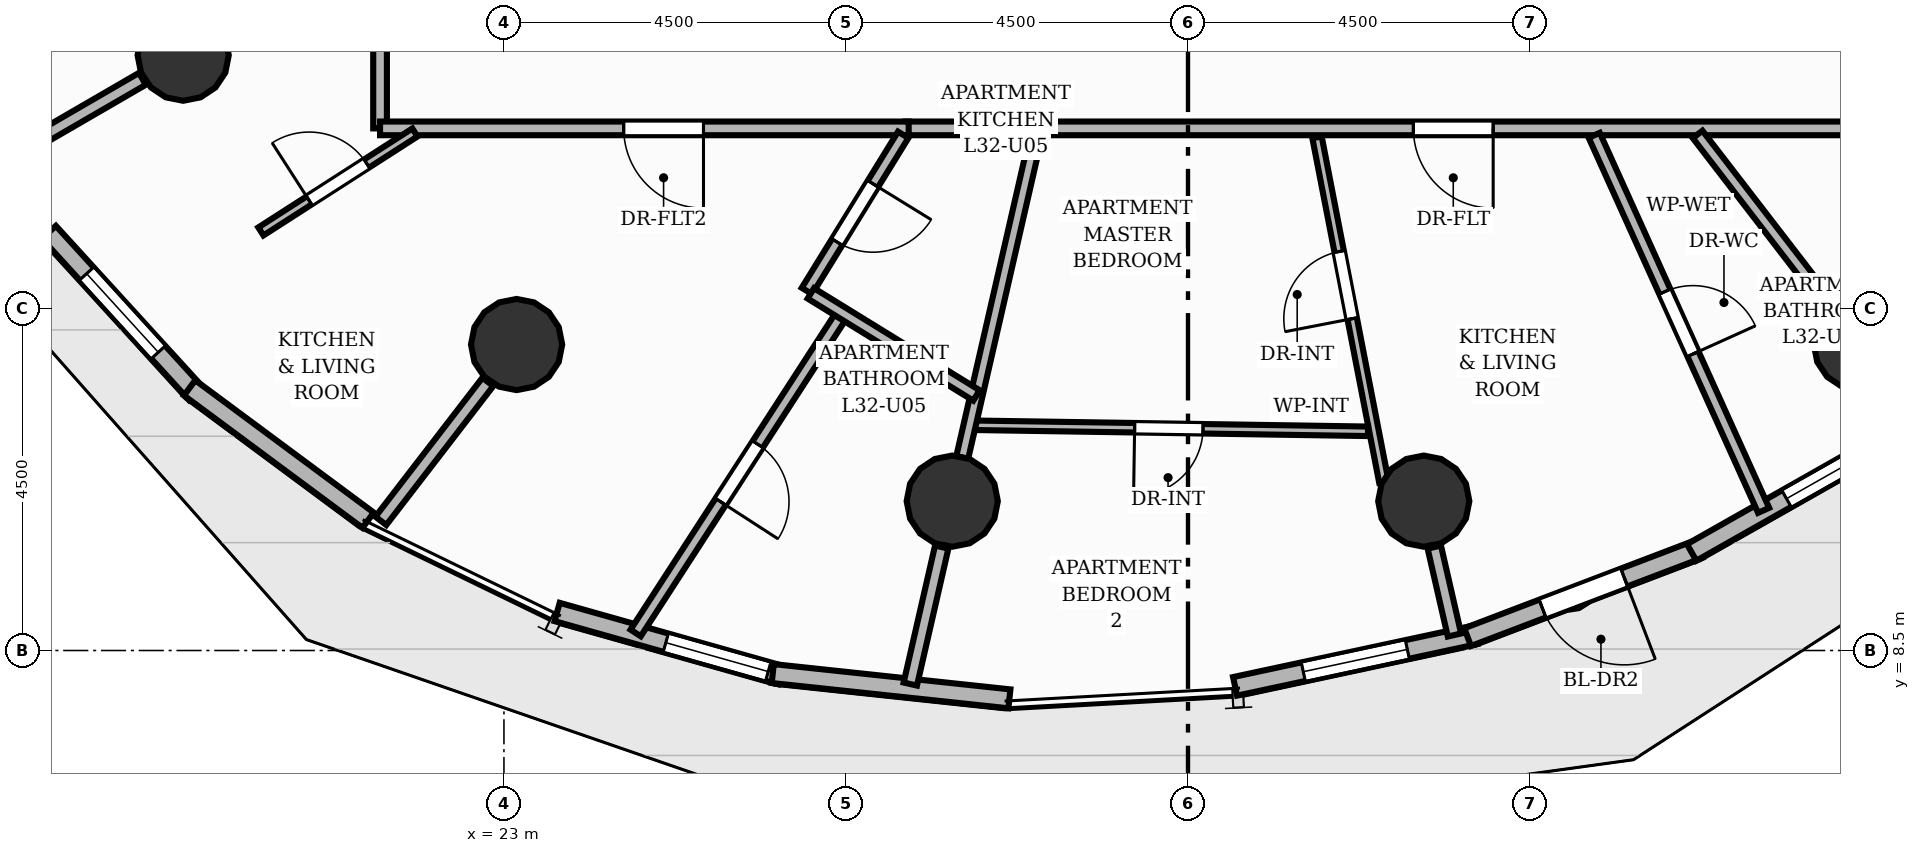
"""IFC4 building model, lengths in metres.
Left out: names, types, materials, properties, quantities, classifications, styles, units other than length and angle.
Written with IfcOpenShell. Run it as: python <this file> out.ifc"""

import sys

from ifc_helpers import new_model, si_unit, direction, frame, frame_2d, origin, origin_2d, place, context, subcontext, project, spatial, rectangle, circle, extrude, element, fill, save


model = new_model("IFC4")
c1 = context("Model", 3, precision=1e-05, world=origin(), true_north=direction((0.0, 1.0)))
c2 = subcontext(c1, "Body", "Model", "MODEL_VIEW")
j1 = project(units=[si_unit("LENGTHUNIT", "METRE"), si_unit("PLANEANGLEUNIT", "RADIAN")], contexts=[c1])
p1 = place(None, origin())
s1 = spatial("IfcSite", under=j1, at=p1, CompositionType="ELEMENT")
p2 = place(p1, origin())
s2 = spatial("IfcBuilding", under=s1, at=p2, CompositionType="ELEMENT")
p3 = place(p2, frame((0.0, 0.0, 109.28)))
s3 = spatial("IfcBuildingStorey", under=s2, at=p3, CompositionType="ELEMENT", Elevation=109.28)
for number, where, z_axis, x_axis in (
    (1, (18.78, 16.333, 0.0), (0.0, 0.0, 1.0), (1.0, 0.0, 0.0)),
    (2, (23.167, 12.526, 0.0), (0.0, 0.0, 1.0), (1.0, 0.0, 0.0)),
    (3, (28.898, 10.465, 0.0), (0.0, 0.0, 1.0), (1.0, 0.0, 0.0)),
    (4, (35.102, 10.465, 0.0), (0.0, 0.0, 1.0), (1.0, 0.0, 0.0)),
    (5, (40.833, 12.526, 0.0), (0.0, 0.0, 1.0), (1.0, 0.0, 0.0)),
):
    element("IfcColumn", number, at=place(p3, frame(where, z_axis=z_axis, x_axis=x_axis)), inside=s3, PredefinedType="COLUMN", context=c2, shape_type="SweptSolid", body=[
        extrude(circle(Radius=0.6, at=origin_2d()), origin(), (0.0, 0.0, 1.0), 3.2),
    ])
p4 = place(p3, frame((18.949, 11.879, 0.0), z_axis=(0.0, 0.0, 1.0), x_axis=(-0.673691100196, 0.739013059098, 0.0)))
e6 = element("IfcWall", 6, at=p4, inside=s3, PredefinedType="SOLIDWALL", context=c2, shape_type="SweptSolid", body=[
    extrude(rectangle(XDim=2.874, YDim=0.25, at=frame_2d((1.437, 0.0))), origin(), (0.0, 0.0, 1.0), 2.8),
])
p5 = place(p4, frame((0.737, 0.0, 0.85)))
e7 = element("IfcOpeningElement", 7, at=p5, cuts=e6, PredefinedType="OPENING", context=c2, shape_type="SweptSolid", body=[
    extrude(rectangle(XDim=1.4, YDim=1.55, at=frame_2d((0.7, 0.775))), frame((0.0, 0.135, 0.0), z_axis=(0.0, -1.0, 0.0), x_axis=(1.0, 0.0, 0.0)), (0.0, 0.0, 1.0), 0.27),
])
p6 = place(p3, frame((21.213, 10.215, 0.0), z_axis=(0.0, 0.0, 1.0), x_axis=(-0.803255279066, 0.595634918933, 0.0)))
e8 = element("IfcWall", 8, at=p6, inside=s3, PredefinedType="SOLIDWALL", context=c2, shape_type="SweptSolid", body=[
    extrude(rectangle(XDim=2.923, YDim=0.25, at=frame_2d((1.462, 0.0))), origin(), (0.0, 0.0, 1.0), 2.8),
])
p7 = place(p3, frame((26.646, 8.175, 0.0), z_axis=(0.0, 0.0, 1.0), x_axis=(-0.962391946781, 0.271664758059, 0.0)))
e9 = element("IfcWall", 9, at=p7, inside=s3, PredefinedType="SOLIDWALL", context=c2, shape_type="SweptSolid", body=[
    extrude(rectangle(XDim=3.061, YDim=0.25, at=frame_2d((1.531, 0.0))), origin(), (0.0, 0.0, 1.0), 2.8),
])
p8 = place(p7, frame((0.175, 0.0, 0.85)))
e10 = element("IfcOpeningElement", 10, at=p8, cuts=e9, PredefinedType="OPENING", context=c2, shape_type="SweptSolid", body=[
    extrude(rectangle(XDim=1.4, YDim=1.55, at=frame_2d((0.7, 0.775))), frame((0.0, 0.135, 0.0), z_axis=(0.0, -1.0, 0.0), x_axis=(1.0, 0.0, 0.0)), (0.0, 0.0, 1.0), 0.27),
])
p9 = place(p3, frame((29.65, 7.864, 0.0), z_axis=(0.0, 0.0, 1.0), x_axis=(-0.994353607356, 0.106117404502, 0.0)))
e11 = element("IfcWall", 11, at=p9, inside=s3, PredefinedType="SOLIDWALL", context=c2, shape_type="SweptSolid", body=[
    extrude(rectangle(XDim=3.131, YDim=0.25, at=frame_2d((1.565, 0.0))), origin(), (0.0, 0.0, 1.0), 2.8),
])
p10 = place(p3, frame((35.783, 8.707, 0.0), z_axis=(0.0, 0.0, 1.0), x_axis=(-0.977758229837, -0.209735175845, 0.0)))
e12 = element("IfcWall", 12, at=p10, inside=s3, PredefinedType="SOLIDWALL", context=c2, shape_type="SweptSolid", body=[
    extrude(rectangle(XDim=3.236, YDim=0.25, at=frame_2d((1.618, 0.0))), origin(), (0.0, 0.0, 1.0), 2.8),
])
p11 = place(p10, frame((0.918, 0.0, 0.85)))
e13 = element("IfcOpeningElement", 13, at=p11, cuts=e12, PredefinedType="OPENING", context=c2, shape_type="SweptSolid", body=[
    extrude(rectangle(XDim=1.4, YDim=1.55, at=frame_2d((0.7, 0.775))), frame((0.0, 0.135, 0.0), z_axis=(0.0, -1.0, 0.0), x_axis=(1.0, 0.0, 0.0)), (0.0, 0.0, 1.0), 0.27),
])
p12 = place(p3, frame((38.725, 9.836, 0.0), z_axis=(0.0, 0.0, 1.0), x_axis=(-0.934481801939, -0.3560109013, 0.0)))
e14 = element("IfcWall", 14, at=p12, inside=s3, PredefinedType="SOLIDWALL", context=c2, shape_type="SweptSolid", body=[
    extrude(rectangle(XDim=3.26, YDim=0.25, at=frame_2d((1.63, 0.0))), origin(), (0.0, 0.0, 1.0), 2.8),
])
p13 = place(p12, frame((1.055, 0.0, 0.0)))
e15 = element("IfcOpeningElement", 15, at=p13, cuts=e14, PredefinedType="OPENING", context=c2, shape_type="SweptSolid", body=[
    extrude(rectangle(XDim=1.15, YDim=2.01, at=frame_2d((0.575, 1.005))), frame((0.0, 0.135, 0.0), z_axis=(0.0, -1.0, 0.0), x_axis=(1.0, 0.0, 0.0)), (0.0, 0.0, 1.0), 0.27),
])
p14 = place(p3, frame((41.462, 11.397, 0.0), z_axis=(0.0, 0.0, 1.0), x_axis=(-0.869984700924, -0.493078715986, 0.0)))
e16 = element("IfcWall", 16, at=p14, inside=s3, PredefinedType="SOLIDWALL", context=c2, shape_type="SweptSolid", body=[
    extrude(rectangle(XDim=3.26, YDim=0.25, at=frame_2d((1.63, 0.0))), origin(), (0.0, 0.0, 1.0), 2.8),
])
p15 = place(p14, frame((0.175, 0.0, 0.85)))
e17 = element("IfcOpeningElement", 17, at=p15, cuts=e16, PredefinedType="OPENING", context=c2, shape_type="SweptSolid", body=[
    extrude(rectangle(XDim=1.65, YDim=1.55, at=frame_2d((0.825, 0.775))), frame((0.0, 0.135, 0.0), z_axis=(0.0, -1.0, 0.0), x_axis=(1.0, 0.0, 0.0)), (0.0, 0.0, 1.0), 0.27),
])
p16 = place(p3, frame((18.243, 16.022, 0.0), z_axis=(0.0, 0.0, 1.0), x_axis=(-0.865046864493, -0.501691062539, 0.0)))
e18 = element("IfcWall", 18, at=p16, inside=s3, PredefinedType="PARTITIONING", context=c2, shape_type="SweptSolid", body=[
    extrude(rectangle(XDim=2.028, YDim=0.18, at=frame_2d((1.014, 0.0))), origin(), (0.0, 0.0, 1.0), 2.1),
])
p17 = place(p3, frame((22.788, 12.034, 0.0), z_axis=(0.0, 0.0, 1.0), x_axis=(-0.610007255548, -0.792395827967, 0.0)))
e19 = element("IfcWall", 19, at=p17, inside=s3, PredefinedType="PARTITIONING", context=c2, shape_type="SweptSolid", body=[
    extrude(rectangle(XDim=2.308, YDim=0.18, at=frame_2d((1.154, 0.0))), origin(), (0.0, 0.0, 1.0), 2.1),
])
p18 = place(p3, frame((28.76, 9.861, 0.0), z_axis=(0.0, 0.0, 1.0), x_axis=(-0.2234127464, -0.974723932581, 0.0)))
e20 = element("IfcWall", 20, at=p18, inside=s3, PredefinedType="PARTITIONING", context=c2, shape_type="SweptSolid", body=[
    extrude(rectangle(XDim=1.849, YDim=0.18, at=frame_2d((0.924, 0.0))), origin(), (0.0, 0.0, 1.0), 2.1),
])
p19 = place(p3, frame((35.24, 9.861, 0.0), z_axis=(0.0, 0.0, 1.0), x_axis=(0.223327310752, -0.974743511018, 0.0)))
e21 = element("IfcWall", 21, at=p19, inside=s3, PredefinedType="PARTITIONING", context=c2, shape_type="SweptSolid", body=[
    extrude(rectangle(XDim=1.187, YDim=0.18, at=frame_2d((0.594, 0.0))), origin(), (0.0, 0.0, 1.0), 2.1),
])
p20 = place(p3, frame((42.63, 15.37, 0.0), z_axis=(0.0, 0.0, 1.0), x_axis=(-1.0, 0.0, 0.0)))
e22 = element("IfcWall", 22, at=p20, inside=s3, PredefinedType="PARTITIONING", context=c2, shape_type="SweptSolid", body=[
    extrude(rectangle(XDim=14.346, YDim=0.18, at=frame_2d((7.173, 0.0))), origin(), (0.0, 0.0, 1.0), 2.795),
])
p21 = place(p20, frame((6.615, 0.0, 0.0)))
e23 = element("IfcOpeningElement", 23, at=p21, cuts=e22, PredefinedType="OPENING", context=c2, shape_type="SweptSolid", body=[
    extrude(rectangle(XDim=1.05, YDim=2.15, at=frame_2d((0.525, 1.075))), frame((0.0, 0.1, 0.0), z_axis=(0.0, -1.0, 0.0), x_axis=(1.0, 0.0, 0.0)), (0.0, 0.0, 1.0), 0.2),
])
p22 = place(p3, frame((21.37, 15.37, 0.0), z_axis=(0.0, 0.0, 1.0), x_axis=(0.0, 1.0, 0.0)))
e24 = element("IfcWall", 24, at=p22, inside=s3, PredefinedType="PARTITIONING", context=c2, shape_type="SweptSolid", body=[
    extrude(rectangle(XDim=17.26, YDim=0.18, at=frame_2d((8.63, 0.0))), origin(), (0.0, 0.0, 1.0), 2.795),
])
p23 = place(p22, frame((13.794, 0.0, 0.0)))
e25 = element("IfcOpeningElement", 25, at=p23, cuts=e24, PredefinedType="OPENING", context=c2, shape_type="SweptSolid", body=[
    extrude(rectangle(XDim=1.05, YDim=2.0, at=frame_2d((0.525, 1.0))), frame((0.0, 0.1, 0.0), z_axis=(0.0, -1.0, 0.0), x_axis=(1.0, 0.0, 0.0)), (0.0, 0.0, 1.0), 0.2),
])
p24 = place(p3, frame((28.325, 15.37, 0.0), z_axis=(0.0, 0.0, 1.0), x_axis=(-1.0, 0.0, 0.0)))
e26 = element("IfcWall", 26, at=p24, inside=s3, PredefinedType="PARTITIONING", context=c2, shape_type="SweptSolid", body=[
    extrude(rectangle(XDim=6.955, YDim=0.18, at=frame_2d((3.478, 0.0))), origin(), (0.0, 0.0, 1.0), 2.795),
])
p25 = place(p24, frame((2.7, 0.0, 0.0)))
e27 = element("IfcOpeningElement", 27, at=p25, cuts=e26, PredefinedType="OPENING", context=c2, shape_type="SweptSolid", body=[
    extrude(rectangle(XDim=1.05, YDim=2.0, at=frame_2d((0.525, 1.0))), frame((0.0, 0.1, 0.0), z_axis=(0.0, -1.0, 0.0), x_axis=(1.0, 0.0, 0.0)), (0.0, 0.0, 1.0), 0.2),
])
p26 = place(p3, frame((37.345, 15.279, 0.0), z_axis=(0.0, 0.0, 1.0), x_axis=(0.411532357021, -0.911395149825, 0.0)))
e28 = element("IfcWall", 28, at=p26, inside=s3, PredefinedType="PLUMBINGWALL", context=c2, shape_type="SweptSolid", body=[
    extrude(rectangle(XDim=5.415, YDim=0.16, at=frame_2d((2.707, 0.0))), origin(), (0.0, 0.0, 1.0), 2.481),
])
p27 = place(p26, frame((2.257, 0.0, 0.0)))
e29 = element("IfcOpeningElement", 29, at=p27, cuts=e28, PredefinedType="OPENING", context=c2, shape_type="SweptSolid", body=[
    extrude(rectangle(XDim=0.9, YDim=2.1, at=frame_2d((0.45, 1.05))), frame((0.0, 0.09, 0.0), z_axis=(0.0, -1.0, 0.0), x_axis=(1.0, 0.0, 0.0)), (0.0, 0.0, 1.0), 0.18),
])
p28 = place(p3, frame((34.577, 10.719, 0.0), z_axis=(0.0, 0.0, 1.0), x_axis=(-0.19043944415, 0.981698944744, 0.0)))
e30 = element("IfcWall", 30, at=p28, inside=s3, PredefinedType="PARTITIONING", context=c2, shape_type="SweptSolid", body=[
    extrude(rectangle(XDim=4.618, YDim=0.125, at=frame_2d((2.309, 0.0))), origin(), (0.0, 0.0, 1.0), 2.795),
])
p29 = place(p28, frame((2.187, 0.0, 0.0)))
e31 = element("IfcOpeningElement", 31, at=p29, cuts=e30, PredefinedType="OPENING", context=c2, shape_type="SweptSolid", body=[
    extrude(rectangle(XDim=0.9, YDim=2.1, at=frame_2d((0.45, 1.05))), frame((0.0, 0.073, 0.0), z_axis=(0.0, -1.0, 0.0), x_axis=(1.0, 0.0, 0.0)), (0.0, 0.0, 1.0), 0.145),
])
p30 = place(p3, frame((38.705, 15.291, 0.0), z_axis=(0.0, 0.0, 1.0), x_axis=(0.610033601295, -0.792375545617, 0.0)))
e32 = element("IfcWall", 32, at=p30, inside=s3, PredefinedType="PLUMBINGWALL", context=c2, shape_type="SweptSolid", body=[
    extrude(rectangle(XDim=2.887, YDim=0.16, at=frame_2d((1.443, 0.0))), origin(), (0.0, 0.0, 1.0), 2.1),
])
p31 = place(p3, frame((34.368, 11.384, 0.0), z_axis=(0.0, 0.0, 1.0), x_axis=(-0.999882579861, 0.015324049414, 0.0)))
e33 = element("IfcWall", 33, at=p31, inside=s3, PredefinedType="PARTITIONING", context=c2, shape_type="SweptSolid", body=[
    extrude(rectangle(XDim=5.242, YDim=0.125, at=frame_2d((2.621, 0.0))), origin(), (0.0, 0.0, 1.0), 2.795),
])
p32 = place(p31, frame((2.171, 0.0, 0.0)))
e34 = element("IfcOpeningElement", 34, at=p32, cuts=e33, PredefinedType="OPENING", context=c2, shape_type="SweptSolid", body=[
    extrude(rectangle(XDim=0.9, YDim=2.1, at=frame_2d((0.45, 1.05))), frame((0.0, 0.073, 0.0), z_axis=(0.0, -1.0, 0.0), x_axis=(1.0, 0.0, 0.0)), (0.0, 0.0, 1.0), 0.145),
])
p33 = place(p3, frame((29.03, 11.041, 0.0), z_axis=(0.0, 0.0, 1.0), x_axis=(0.223478419757, 0.974708877513, 0.0)))
e35 = element("IfcWall", 35, at=p33, inside=s3, PredefinedType="PLUMBINGWALL", context=c2, shape_type="SweptSolid", body=[
    extrude(rectangle(XDim=4.442, YDim=0.16, at=frame_2d((2.221, 0.0))), origin(), (0.0, 0.0, 1.0), 2.1),
])
p34 = place(p3, frame((27.458, 12.94, 0.0), z_axis=(0.0, 0.0, 1.0), x_axis=(-0.543424886613, -0.839457796801, 0.0)))
e36 = element("IfcWall", 36, at=p34, inside=s3, PredefinedType="PLUMBINGWALL", context=c2, shape_type="SweptSolid", body=[
    extrude(rectangle(XDim=5.014, YDim=0.16, at=frame_2d((2.507, 0.0))), origin(), (0.0, 0.0, 1.0), 2.481),
])
p35 = place(p34, frame((2.057, 0.0, 0.0)))
e37 = element("IfcOpeningElement", 37, at=p35, cuts=e36, PredefinedType="OPENING", context=c2, shape_type="SweptSolid", body=[
    extrude(rectangle(XDim=0.9, YDim=2.1, at=frame_2d((0.45, 1.05))), frame((0.0, 0.09, 0.0), z_axis=(0.0, -1.0, 0.0), x_axis=(1.0, 0.0, 0.0)), (0.0, 0.0, 1.0), 0.18),
])
p36 = place(p3, frame((19.802, 14.014, 0.0), z_axis=(0.0, 0.0, 1.0), x_axis=(0.841349696578, 0.540491154477, 0.0)))
e38 = element("IfcWall", 38, at=p36, inside=s3, PredefinedType="PARTITIONING", context=c2, shape_type="SweptSolid", body=[
    extrude(rectangle(XDim=2.408, YDim=0.125, at=frame_2d((1.204, 0.0))), origin(), (0.0, 0.0, 1.0), 2.795),
])
p37 = place(p36, frame((0.754, 0.0, 0.0)))
e39 = element("IfcOpeningElement", 39, at=p37, cuts=e38, PredefinedType="OPENING", context=c2, shape_type="SweptSolid", body=[
    extrude(rectangle(XDim=0.9, YDim=2.1, at=frame_2d((0.45, 1.05))), frame((0.0, 0.073, 0.0), z_axis=(0.0, -1.0, 0.0), x_axis=(1.0, 0.0, 0.0)), (0.0, 0.0, 1.0), 0.145),
])
p38 = place(p3, frame((28.253, 15.285, 0.0), z_axis=(0.0, 0.0, 1.0), x_axis=(-0.524605293124, -0.851345574033, 0.0)))
e40 = element("IfcWall", 40, at=p38, inside=s3, PredefinedType="PLUMBINGWALL", context=c2, shape_type="SweptSolid", body=[
    extrude(rectangle(XDim=2.414, YDim=0.16, at=frame_2d((1.207, 0.0))), origin(), (0.0, 0.0, 1.0), 2.795),
])
p39 = place(p38, frame((0.757, 0.0, 0.0)))
e41 = element("IfcOpeningElement", 41, at=p39, cuts=e40, PredefinedType="OPENING", context=c2, shape_type="SweptSolid", body=[
    extrude(rectangle(XDim=0.9, YDim=2.1, at=frame_2d((0.45, 1.05))), frame((0.0, 0.09, 0.0), z_axis=(0.0, -1.0, 0.0), x_axis=(1.0, 0.0, 0.0)), (0.0, 0.0, 1.0), 0.18),
])
p40 = place(p3, frame((27.038, 13.199, 0.0), z_axis=(0.0, 0.0, 1.0), x_axis=(0.851314293413, -0.524656052887, 0.0)))
e42 = element("IfcWall", 42, at=p40, inside=s3, PredefinedType="PLUMBINGWALL", context=c2, shape_type="SweptSolid", body=[
    extrude(rectangle(XDim=2.56, YDim=0.16, at=frame_2d((1.28, 0.0))), origin(), (0.0, 0.0, 1.0), 2.795),
])
p41 = place(p13, origin())
e43 = element("IfcDoor", 43, at=p41, inside=s3, OperationType="SINGLE_SWING_LEFT", PredefinedType="DOOR", context=c2, shape_type="SweptSolid", body=[
    extrude(rectangle(XDim=1.15, YDim=2.01, at=frame_2d((0.575, 1.005))), frame((0.0, 0.025, 0.0), z_axis=(0.0, -1.0, 0.0), x_axis=(1.0, 0.0, 0.0)), (0.0, 0.0, 1.0), 0.05),
])
fill(e15, e43)
p42 = place(p5, origin())
e44 = element("IfcWindow", 44, at=p42, inside=s3, PartitioningType="SINGLE_PANEL", PredefinedType="WINDOW", context=c2, shape_type="SweptSolid", body=[
    extrude(rectangle(XDim=1.4, YDim=1.55, at=frame_2d((0.7, 0.775))), frame((0.0, 0.03, 0.0), z_axis=(0.0, -1.0, 0.0), x_axis=(1.0, 0.0, 0.0)), (0.0, 0.0, 1.0), 0.06),
])
fill(e7, e44)
p43 = place(p8, origin())
e45 = element("IfcWindow", 45, at=p43, inside=s3, PartitioningType="SINGLE_PANEL", PredefinedType="WINDOW", context=c2, shape_type="SweptSolid", body=[
    extrude(rectangle(XDim=1.4, YDim=1.55, at=frame_2d((0.7, 0.775))), frame((0.0, 0.03, 0.0), z_axis=(0.0, -1.0, 0.0), x_axis=(1.0, 0.0, 0.0)), (0.0, 0.0, 1.0), 0.06),
])
fill(e10, e45)
p44 = place(p11, origin())
e46 = element("IfcWindow", 46, at=p44, inside=s3, PartitioningType="SINGLE_PANEL", PredefinedType="WINDOW", context=c2, shape_type="SweptSolid", body=[
    extrude(rectangle(XDim=1.4, YDim=1.55, at=frame_2d((0.7, 0.775))), frame((0.0, 0.03, 0.0), z_axis=(0.0, -1.0, 0.0), x_axis=(1.0, 0.0, 0.0)), (0.0, 0.0, 1.0), 0.06),
])
fill(e13, e46)
p45 = place(p15, origin())
e47 = element("IfcWindow", 47, at=p45, inside=s3, PartitioningType="SINGLE_PANEL", PredefinedType="WINDOW", context=c2, shape_type="SweptSolid", body=[
    extrude(rectangle(XDim=1.65, YDim=1.55, at=frame_2d((0.825, 0.775))), frame((0.0, 0.03, 0.0), z_axis=(0.0, -1.0, 0.0), x_axis=(1.0, 0.0, 0.0)), (0.0, 0.0, 1.0), 0.06),
])
fill(e17, e47)
p46 = place(p21, origin())
e48 = element("IfcDoor", 48, at=p46, inside=s3, OperationType="SINGLE_SWING_LEFT", PredefinedType="DOOR", context=c2, shape_type="SweptSolid", body=[
    extrude(rectangle(XDim=1.05, YDim=2.15, at=frame_2d((0.525, 1.075))), frame((0.0, 0.025, 0.0), z_axis=(0.0, -1.0, 0.0), x_axis=(1.0, 0.0, 0.0)), (0.0, 0.0, 1.0), 0.05),
])
fill(e23, e48)
p47 = place(p27, origin())
e49 = element("IfcDoor", 49, at=p47, inside=s3, OperationType="SINGLE_SWING_RIGHT", PredefinedType="DOOR", context=c2, shape_type="SweptSolid", body=[
    extrude(rectangle(XDim=0.9, YDim=2.1, at=frame_2d((0.45, 1.05))), frame((0.0, 0.025, 0.0), z_axis=(0.0, -1.0, 0.0), x_axis=(1.0, 0.0, 0.0)), (0.0, 0.0, 1.0), 0.05),
])
fill(e29, e49)
p48 = place(p29, origin())
e50 = element("IfcDoor", 50, at=p48, inside=s3, OperationType="SINGLE_SWING_LEFT", PredefinedType="DOOR", context=c2, shape_type="SweptSolid", body=[
    extrude(rectangle(XDim=0.9, YDim=2.1, at=frame_2d((0.45, 1.05))), frame((0.0, 0.025, 0.0), z_axis=(0.0, -1.0, 0.0), x_axis=(1.0, 0.0, 0.0)), (0.0, 0.0, 1.0), 0.05),
])
fill(e31, e50)
p49 = place(p32, origin())
e51 = element("IfcDoor", 51, at=p49, inside=s3, OperationType="SINGLE_SWING_RIGHT", PredefinedType="DOOR", context=c2, shape_type="SweptSolid", body=[
    extrude(rectangle(XDim=0.9, YDim=2.1, at=frame_2d((0.45, 1.05))), frame((0.0, 0.025, 0.0), z_axis=(0.0, -1.0, 0.0), x_axis=(1.0, 0.0, 0.0)), (0.0, 0.0, 1.0), 0.05),
])
fill(e34, e51)
p50 = place(p25, origin())
e52 = element("IfcDoor", 52, at=p50, inside=s3, OperationType="SINGLE_SWING_LEFT", PredefinedType="DOOR", context=c2, shape_type="SweptSolid", body=[
    extrude(rectangle(XDim=1.05, YDim=2.0, at=frame_2d((0.525, 1.0))), frame((0.0, 0.025, 0.0), z_axis=(0.0, -1.0, 0.0), x_axis=(1.0, 0.0, 0.0)), (0.0, 0.0, 1.0), 0.05),
])
fill(e27, e52)
p51 = place(p35, origin())
e53 = element("IfcDoor", 53, at=p51, inside=s3, OperationType="SINGLE_SWING_RIGHT", PredefinedType="DOOR", context=c2, shape_type="SweptSolid", body=[
    extrude(rectangle(XDim=0.9, YDim=2.1, at=frame_2d((0.45, 1.05))), frame((0.0, 0.025, 0.0), z_axis=(0.0, -1.0, 0.0), x_axis=(1.0, 0.0, 0.0)), (0.0, 0.0, 1.0), 0.05),
])
fill(e37, e53)
p52 = place(p37, origin())
e54 = element("IfcDoor", 54, at=p52, inside=s3, OperationType="SINGLE_SWING_LEFT", PredefinedType="DOOR", context=c2, shape_type="SweptSolid", body=[
    extrude(rectangle(XDim=0.9, YDim=2.1, at=frame_2d((0.45, 1.05))), frame((0.0, 0.025, 0.0), z_axis=(0.0, -1.0, 0.0), x_axis=(1.0, 0.0, 0.0)), (0.0, 0.0, 1.0), 0.05),
])
fill(e39, e54)
p53 = place(p39, origin())
e55 = element("IfcDoor", 55, at=p53, inside=s3, OperationType="SINGLE_SWING_LEFT", PredefinedType="DOOR", context=c2, shape_type="SweptSolid", body=[
    extrude(rectangle(XDim=0.9, YDim=2.1, at=frame_2d((0.45, 1.05))), frame((0.0, 0.025, 0.0), z_axis=(0.0, -1.0, 0.0), x_axis=(1.0, 0.0, 0.0)), (0.0, 0.0, 1.0), 0.05),
])
fill(e41, e55)
save(model, sys.argv[1])
